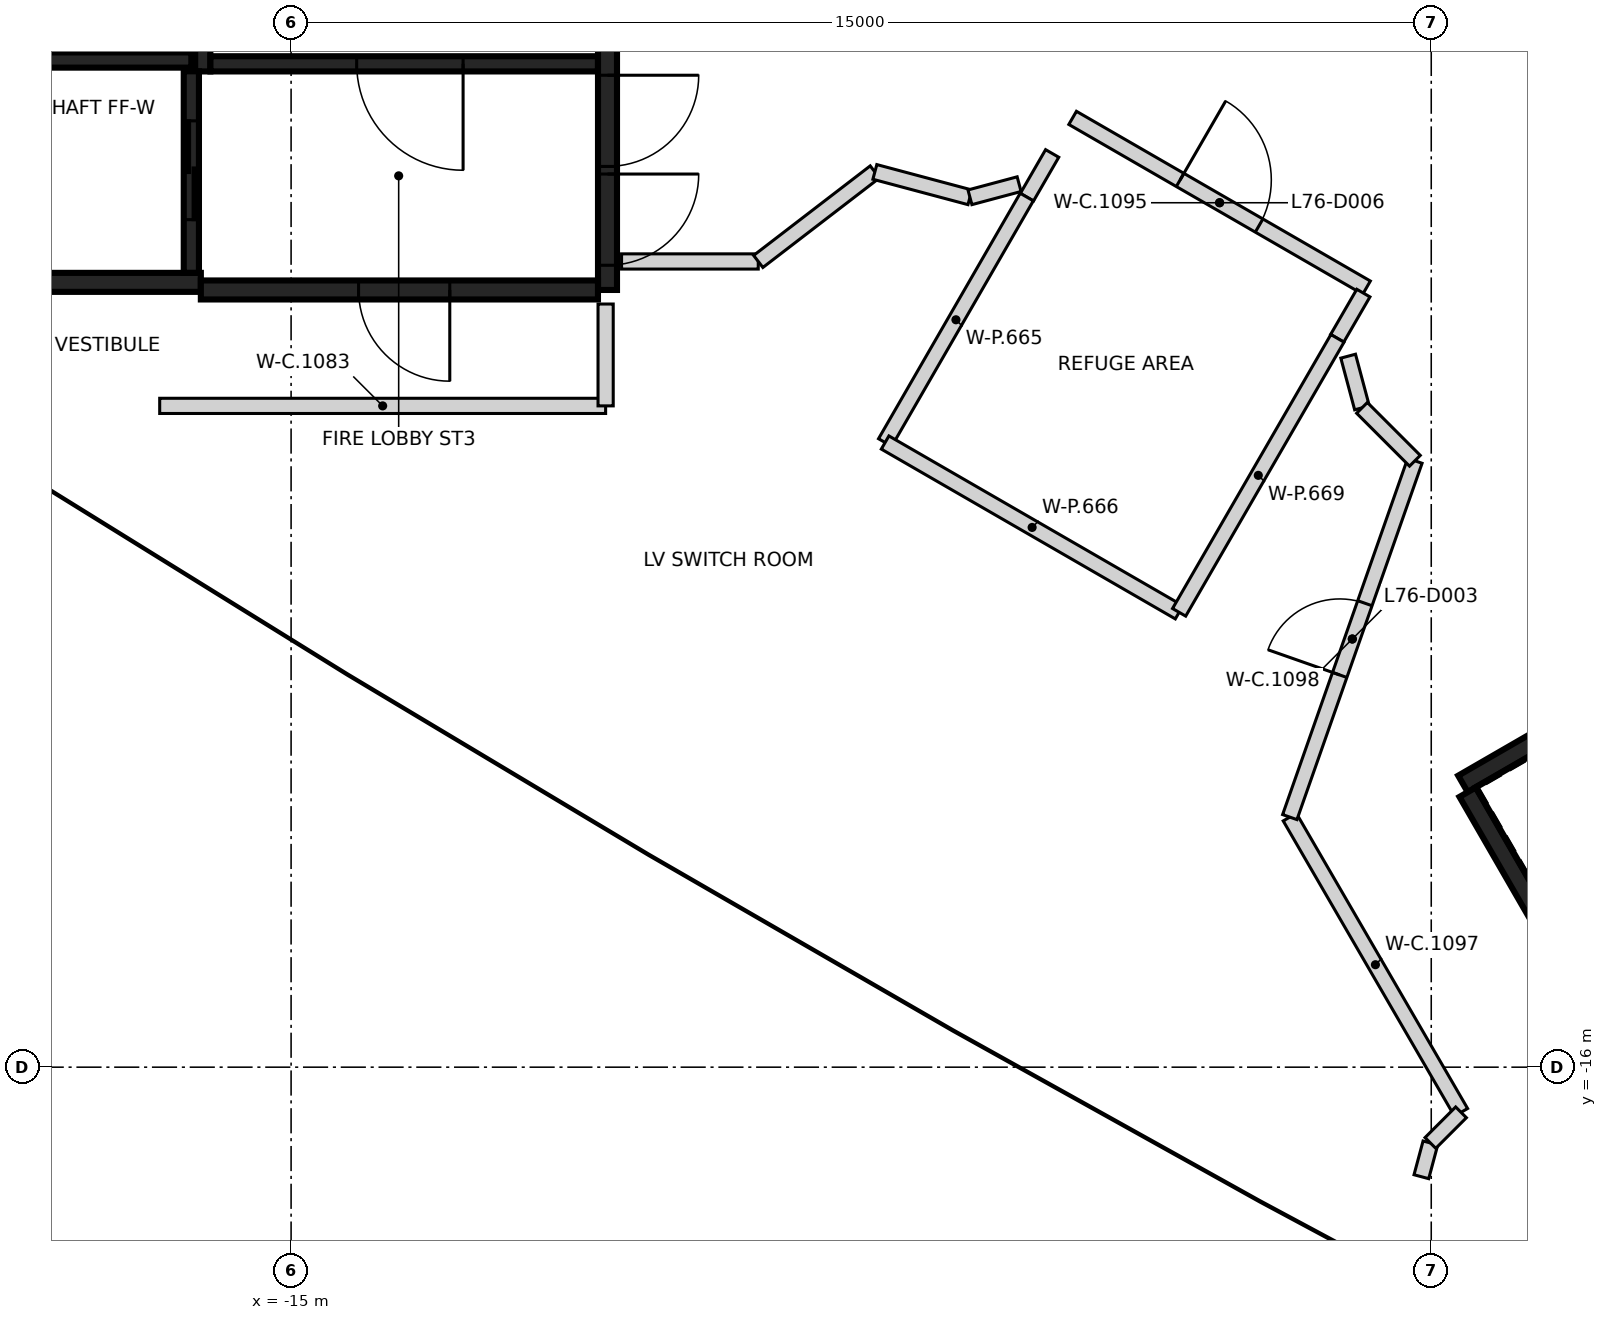
"""IFC4 building model, lengths in metres.
Left out: names, types, materials, properties, quantities, classifications, styles, units other than length and angle.
Written with IfcOpenShell. Run it as: python <this file> out.ifc"""

import sys

from ifc_helpers import new_model, si_unit, direction, frame, frame_2d, origin, place, context, subcontext, project, spatial, rectangle, extrude, element, fill, save


model = new_model("IFC4")
c1 = context("Model", 3, precision=1e-05, world=origin(), true_north=direction((0.0, 1.0)))
c2 = subcontext(c1, "Body", "Model", "MODEL_VIEW")
j1 = project(units=[si_unit("LENGTHUNIT", "METRE"), si_unit("PLANEANGLEUNIT", "RADIAN")], contexts=[c1])
p1 = place(None, origin())
s1 = spatial("IfcSite", under=j1, at=p1, CompositionType="ELEMENT")
p2 = place(p1, origin())
s2 = spatial("IfcBuilding", under=s1, at=p2, CompositionType="ELEMENT")
p3 = place(p2, frame((0.0, 0.0, 301.8)))
s3 = spatial("IfcBuildingStorey", under=s2, at=p3, CompositionType="ELEMENT", Elevation=301.8)
p4 = place(p3, frame((-10.837, 5.775, 0.0), z_axis=(0.0, 0.0, 1.0), x_axis=(0.0, -1.0, 0.0)))
e1 = element("IfcWall", 1, at=p4, inside=s3, PredefinedType="SHEAR", context=c2, shape_type="SweptSolid", body=[
    extrude(rectangle(XDim=11.55, YDim=0.25, at=frame_2d((5.775, 0.0))), origin(), (0.0, 0.0, 1.0), 4.45),
])
p5 = place(p4, frame((10.025, 0.0, 0.0)))
e2 = element("IfcOpeningElement", 2, at=p5, cuts=e1, PredefinedType="OPENING", context=c2, shape_type="SweptSolid", body=[
    extrude(rectangle(XDim=1.2, YDim=2.1, at=frame_2d((0.6, 1.05))), frame((0.0, 0.135, 0.0), z_axis=(0.0, -1.0, 0.0), x_axis=(1.0, 0.0, 0.0)), (0.0, 0.0, 1.0), 0.27),
])
p6 = place(p4, frame((8.725, 0.0, 0.0)))
e3 = element("IfcOpeningElement", 3, at=p6, cuts=e1, PredefinedType="OPENING", context=c2, shape_type="SweptSolid", body=[
    extrude(rectangle(XDim=1.2, YDim=2.1, at=frame_2d((0.6, 1.05))), frame((0.0, 0.135, 0.0), z_axis=(0.0, -1.0, 0.0), x_axis=(1.0, 0.0, 0.0)), (0.0, 0.0, 1.0), 0.27),
])
p7 = place(p3, frame((-16.187, -5.675, 0.0), z_axis=(0.0, 0.0, 1.0), x_axis=(-1.0, 0.0, 0.0)))
e4 = element("IfcWall", 4, at=p7, inside=s3, PredefinedType="SHEAR", context=c2, shape_type="SweptSolid", body=[
    extrude(rectangle(XDim=6.125, YDim=0.25, at=frame_2d((3.062, 0.0))), origin(), (0.0, 0.0, 1.0), 4.45),
])
p8 = place(p7, frame((4.563, 0.0, 0.0)))
e5 = element("IfcOpeningElement", 5, at=p8, cuts=e4, PredefinedType="OPENING", context=c2, shape_type="SweptSolid", body=[
    extrude(rectangle(XDim=1.0, YDim=2.1, at=frame_2d((0.5, 1.05))), frame((0.0, 0.135, 0.0), z_axis=(0.0, -1.0, 0.0), x_axis=(1.0, 0.0, 0.0)), (0.0, 0.0, 1.0), 0.27),
])
p9 = place(p3, frame((-10.963, -5.775, 0.0), z_axis=(0.0, 0.0, 1.0), x_axis=(-1.0, 0.0, 0.0)))
e6 = element("IfcWall", 6, at=p9, inside=s3, PredefinedType="SHEAR", context=c2, shape_type="SweptSolid", body=[
    extrude(rectangle(XDim=5.225, YDim=0.25, at=frame_2d((2.612, 0.0))), origin(), (0.0, 0.0, 1.0), 4.45),
])
p10 = place(p9, frame((1.95, 0.0, 0.0)))
e7 = element("IfcOpeningElement", 7, at=p10, cuts=e6, PredefinedType="OPENING", context=c2, shape_type="SweptSolid", body=[
    extrude(rectangle(XDim=1.2, YDim=2.1, at=frame_2d((0.6, 1.05))), frame((0.0, 0.135, 0.0), z_axis=(0.0, -1.0, 0.0), x_axis=(1.0, 0.0, 0.0)), (0.0, 0.0, 1.0), 0.27),
])
p11 = place(p3, frame((-16.162, 3.074, 0.0), z_axis=(0.0, 0.0, 1.0), x_axis=(0.0, -1.0, 0.0)))
e8 = element("IfcWall", 8, at=p11, inside=s3, PredefinedType="SHEAR", context=c2, shape_type="SweptSolid", body=[
    extrude(rectangle(XDim=5.974, YDim=0.2, at=frame_2d((2.987, 0.0))), origin(), (0.0, 0.0, 1.0), 4.45),
])
p12 = place(p3, frame((-10.963, -2.8, 0.0), z_axis=(0.0, 0.0, 1.0), x_axis=(-1.0, 0.0, 0.0)))
e9 = element("IfcWall", 9, at=p12, inside=s3, PredefinedType="SHEAR", context=c2, shape_type="SweptSolid", body=[
    extrude(rectangle(XDim=5.098, YDim=0.2, at=frame_2d((2.549, 0.0))), origin(), (0.0, 0.0, 1.0), 4.45),
])
p13 = place(p12, frame((1.774, 0.0, 0.0)))
e10 = element("IfcOpeningElement", 10, at=p13, cuts=e9, PredefinedType="OPENING", context=c2, shape_type="SweptSolid", body=[
    extrude(rectangle(XDim=1.4, YDim=2.1, at=frame_2d((0.7, 1.05))), frame((0.0, 0.11, 0.0), z_axis=(0.0, -1.0, 0.0), x_axis=(1.0, 0.0, 0.0)), (0.0, 0.0, 1.0), 0.22),
])
p14 = place(p3, frame((-19.412, -2.75, 0.0), z_axis=(0.0, 0.0, 1.0), x_axis=(1.0, 0.0, 0.0)))
e11 = element("IfcWall", 11, at=p14, inside=s3, PredefinedType="SHEAR", context=c2, shape_type="SweptSolid", body=[
    extrude(rectangle(XDim=3.1, YDim=0.2, at=frame_2d((1.55, 0.0))), origin(), (0.0, 0.0, 1.0), 4.45),
])
p15 = place(p3, frame((-16.312, -2.898, 0.0), z_axis=(0.0, 0.0, 1.0), x_axis=(0.0, -1.0, 0.0)))
e12 = element("IfcWall", 12, at=p15, inside=s3, PredefinedType="SHEAR", context=c2, shape_type="SweptSolid", body=[
    extrude(rectangle(XDim=2.651, YDim=0.2, at=frame_2d((1.325, 0.0))), origin(), (0.0, 0.0, 1.0), 4.45),
])
p16 = place(p15, frame((0.652, 0.0, 0.0)))
e13 = element("IfcOpeningElement", 13, at=p16, cuts=e12, PredefinedType="OPENING", context=c2, shape_type="SweptSolid", body=[
    extrude(rectangle(XDim=1.3, YDim=2.1, at=frame_2d((0.65, 1.05))), frame((0.0, 0.11, 0.0), z_axis=(0.0, -1.0, 0.0), x_axis=(1.0, 0.0, 0.0)), (0.0, 0.0, 1.0), 0.22),
])
p17 = place(p3, frame((0.417, -12.273, 0.0), z_axis=(0.0, 0.0, 1.0), x_axis=(0.866021906294, 0.500006057782, 0.0)))
e14 = element("IfcWall", 14, at=p17, inside=s3, PredefinedType="SHEAR", context=c2, shape_type="SweptSolid", body=[
    extrude(rectangle(XDim=11.55, YDim=0.25, at=frame_2d((5.775, 0.0))), origin(), (0.0, 0.0, 1.0), 4.45),
])
p18 = place(p17, frame((10.025, 0.0, 0.0)))
e15 = element("IfcOpeningElement", 15, at=p18, cuts=e14, PredefinedType="OPENING", context=c2, shape_type="SweptSolid", body=[
    extrude(rectangle(XDim=1.2, YDim=2.1, at=frame_2d((0.6, 1.05))), frame((0.0, 0.135, 0.0), z_axis=(0.0, -1.0, 0.0), x_axis=(1.0, 0.0, 0.0)), (0.0, 0.0, 1.0), 0.27),
])
p19 = place(p17, frame((8.725, 0.0, 0.0)))
e16 = element("IfcOpeningElement", 16, at=p19, cuts=e14, PredefinedType="OPENING", context=c2, shape_type="SweptSolid", body=[
    extrude(rectangle(XDim=1.2, YDim=2.1, at=frame_2d((0.6, 1.05))), frame((0.0, 0.135, 0.0), z_axis=(0.0, -1.0, 0.0), x_axis=(1.0, 0.0, 0.0)), (0.0, 0.0, 1.0), 0.27),
])
p20 = place(p3, frame((3.235, -17.153, 0.0), z_axis=(0.0, 0.0, 1.0), x_axis=(-0.500008851346, 0.866020293397, 0.0)))
e17 = element("IfcWall", 17, at=p20, inside=s3, PredefinedType="SHEAR", context=c2, shape_type="SweptSolid", body=[
    extrude(rectangle(XDim=5.51, YDim=0.25, at=frame_2d((2.755, 0.0))), origin(), (0.0, 0.0, 1.0), 4.45),
])
p21 = place(p3, frame((-16.729, -7.3, 0.0), z_axis=(0.0, 0.0, 1.0), x_axis=(1.0, 0.0, 0.0)))
e18 = element("IfcWall", 18, at=p21, inside=s3, PredefinedType="PARTITIONING", context=c2, shape_type="SweptSolid", body=[
    extrude(rectangle(XDim=5.867, YDim=0.2, at=frame_2d((2.933, 0.0))), origin(), (0.0, 0.0, 1.0), 4.45),
])
p22 = place(p3, frame((-10.862, -7.3, 0.0), z_axis=(0.0, 0.0, 1.0), x_axis=(0.0, 1.0, 0.0)))
e19 = element("IfcWall", 19, at=p22, inside=s3, PredefinedType="PARTITIONING", context=c2, shape_type="SweptSolid", body=[
    extrude(rectangle(XDim=1.34, YDim=0.2, at=frame_2d((0.67, 0.0))), origin(), (0.0, 0.0, 1.0), 4.45),
])
p23 = place(p3, frame((-10.652, -5.4, 0.0), z_axis=(0.0, 0.0, 1.0), x_axis=(1.0, 0.0, 0.0)))
e20 = element("IfcWall", 20, at=p23, inside=s3, PredefinedType="PARTITIONING", context=c2, shape_type="SweptSolid", body=[
    extrude(rectangle(XDim=1.798, YDim=0.2, at=frame_2d((0.899, 0.0))), origin(), (0.0, 0.0, 1.0), 4.45),
])
p24 = place(p3, frame((-8.854, -5.4, 0.0), z_axis=(0.0, 0.0, 1.0), x_axis=(0.793116457917, 0.609070015828, 0.0)))
e21 = element("IfcWall", 21, at=p24, inside=s3, PredefinedType="PARTITIONING", context=c2, shape_type="SweptSolid", body=[
    extrude(rectangle(XDim=1.934, YDim=0.2, at=frame_2d((0.967, 0.0))), origin(), (0.0, 0.0, 1.0), 4.45),
])
p25 = place(p3, frame((-7.32, -4.222, 0.0), z_axis=(0.0, 0.0, 1.0), x_axis=(0.966159789195, -0.257944299691, 0.0)))
e22 = element("IfcWall", 22, at=p25, inside=s3, PredefinedType="PARTITIONING", context=c2, shape_type="SweptSolid", body=[
    extrude(rectangle(XDim=1.295, YDim=0.2, at=frame_2d((0.647, 0.0))), origin(), (0.0, 0.0, 1.0), 4.45),
])
p26 = place(p3, frame((-6.069, -4.556, 0.0), z_axis=(0.0, 0.0, 1.0), x_axis=(0.966113813523, 0.258116445273, 0.0)))
e23 = element("IfcWall", 23, at=p26, inside=s3, PredefinedType="PARTITIONING", context=c2, shape_type="SweptSolid", body=[
    extrude(rectangle(XDim=0.67, YDim=0.2, at=frame_2d((0.335, 0.0))), origin(), (0.0, 0.0, 1.0), 4.45),
])
p27 = place(p3, frame((-5.319, -4.554, 0.0), z_axis=(0.0, 0.0, 1.0), x_axis=(0.500093796661, 0.865971243484, 0.0)))
e24 = element("IfcWall", 24, at=p27, inside=s3, PredefinedType="PARTITIONING", context=c2, shape_type="SweptSolid", body=[
    extrude(rectangle(XDim=0.664, YDim=0.2, at=frame_2d((0.332, 0.0))), origin(), (0.0, 0.0, 1.0), 4.45),
])
p28 = place(p3, frame((-4.718, -3.511, 0.0), z_axis=(0.0, 0.0, 1.0), x_axis=(0.865993462583, -0.500055319703, 0.0)))
e25 = element("IfcWall", 25, at=p28, inside=s3, PredefinedType="PARTITIONING", context=c2, shape_type="SweptSolid", body=[
    extrude(rectangle(XDim=4.465, YDim=0.2, at=frame_2d((2.233, 0.0))), origin(), (0.0, 0.0, 1.0), 4.45),
])
p29 = place(p28, frame((1.633, 0.0, 0.0)))
e26 = element("IfcOpeningElement", 26, at=p29, cuts=e25, PredefinedType="OPENING", context=c2, shape_type="SweptSolid", body=[
    extrude(rectangle(XDim=1.2, YDim=2.1, at=frame_2d((0.6, 1.05))), frame((0.0, 0.11, 0.0), z_axis=(0.0, -1.0, 0.0), x_axis=(1.0, 0.0, 0.0)), (0.0, 0.0, 1.0), 0.22),
])
p30 = place(p3, frame((-1.861, -12.71, 0.0), z_axis=(0.0, 0.0, 1.0), x_axis=(0.501790506815, -0.864989183326, 0.0)))
e27 = element("IfcWall", 27, at=p30, inside=s3, PredefinedType="PARTITIONING", context=c2, shape_type="SweptSolid", body=[
    extrude(rectangle(XDim=4.49, YDim=0.2, at=frame_2d((2.245, 0.0))), origin(), (0.0, 0.0, 1.0), 4.45),
])
p31 = place(p3, frame((-1.861, -12.71, 0.0), z_axis=(0.0, 0.0, 1.0), x_axis=(0.331282665584, 0.943531555108, 0.0)))
e28 = element("IfcWall", 28, at=p31, inside=s3, PredefinedType="PARTITIONING", context=c2, shape_type="SweptSolid", body=[
    extrude(rectangle(XDim=4.969, YDim=0.2, at=frame_2d((2.484, 0.0))), origin(), (0.0, 0.0, 1.0), 4.45),
])
p32 = place(p31, frame((1.982, 0.0, 0.0)))
e29 = element("IfcOpeningElement", 29, at=p32, cuts=e28, PredefinedType="OPENING", context=c2, shape_type="SweptSolid", body=[
    extrude(rectangle(XDim=1.0, YDim=2.1, at=frame_2d((0.5, 1.05))), frame((0.0, 0.11, 0.0), z_axis=(0.0, -1.0, 0.0), x_axis=(1.0, 0.0, 0.0)), (0.0, 0.0, 1.0), 0.22),
])
p33 = place(p3, frame((-1.237, -6.41, 0.0), z_axis=(0.0, 0.0, 1.0), x_axis=(0.501148429931, 0.865361341393, 0.0)))
e30 = element("IfcWall", 30, at=p33, inside=s3, PredefinedType="PARTITIONING", context=c2, shape_type="SweptSolid", body=[
    extrude(rectangle(XDim=0.687, YDim=0.2, at=frame_2d((0.343, 0.0))), origin(), (0.0, 0.0, 1.0), 4.45),
])
p34 = place(p3, frame((-1.093, -6.646, 0.0), z_axis=(0.0, 0.0, 1.0), x_axis=(0.258741864149, -0.965946503558, 0.0)))
e31 = element("IfcWall", 31, at=p34, inside=s3, PredefinedType="PARTITIONING", context=c2, shape_type="SweptSolid", body=[
    extrude(rectangle(XDim=0.704, YDim=0.2, at=frame_2d((0.352, 0.0))), origin(), (0.0, 0.0, 1.0), 4.45),
])
p35 = place(p3, frame((-0.911, -7.326, 0.0), z_axis=(0.0, 0.0, 1.0), x_axis=(0.706982738249, -0.707230802368, 0.0)))
e32 = element("IfcWall", 32, at=p35, inside=s3, PredefinedType="PARTITIONING", context=c2, shape_type="SweptSolid", body=[
    extrude(rectangle(XDim=0.984, YDim=0.2, at=frame_2d((0.492, 0.0))), origin(), (0.0, 0.0, 1.0), 4.45),
])
p36 = place(p3, frame((-0.13, -17.441, 0.0), z_axis=(0.0, 0.0, 1.0), x_axis=(0.258753790643, 0.965943308806, 0.0)))
e33 = element("IfcWall", 33, at=p36, inside=s3, PredefinedType="PARTITIONING", context=c2, shape_type="SweptSolid", body=[
    extrude(rectangle(XDim=0.459, YDim=0.2, at=frame_2d((0.23, 0.0))), origin(), (0.0, 0.0, 1.0), 4.45),
])
p37 = place(p3, frame((-0.011, -16.997, 0.0), z_axis=(0.0, 0.0, 1.0), x_axis=(0.707106781187, 0.707106781187, 0.0)))
e34 = element("IfcWall", 34, at=p37, inside=s3, PredefinedType="PARTITIONING", context=c2, shape_type="SweptSolid", body=[
    extrude(rectangle(XDim=0.57, YDim=0.2, at=frame_2d((0.285, 0.0))), origin(), (0.0, 0.0, 1.0), 4.45),
])
p38 = place(p3, frame((-7.185, -7.782, 0.0), z_axis=(0.0, 0.0, 1.0), x_axis=(0.499794252385, 0.866144159642, 0.0)))
e35 = element("IfcWall", 35, at=p38, inside=s3, PredefinedType="PARTITIONING", context=c2, shape_type="SweptSolid", body=[
    extrude(rectangle(XDim=3.729, YDim=0.2, at=frame_2d((1.864, 0.0))), origin(), (0.0, 0.0, 1.0), 4.45),
])
p39 = place(p3, frame((-7.185, -7.782, 0.0), z_axis=(0.0, 0.0, 1.0), x_axis=(0.865943452446, -0.500141917025, 0.0)))
e36 = element("IfcWall", 36, at=p39, inside=s3, PredefinedType="PARTITIONING", context=c2, shape_type="SweptSolid", body=[
    extrude(rectangle(XDim=4.467, YDim=0.2, at=frame_2d((2.233, 0.0))), origin(), (0.0, 0.0, 1.0), 4.45),
])
p40 = place(p3, frame((-3.317, -10.016, 0.0), z_axis=(0.0, 0.0, 1.0), x_axis=(0.500307886715, 0.865847572319, 0.0)))
e37 = element("IfcWall", 37, at=p40, inside=s3, PredefinedType="PARTITIONING", context=c2, shape_type="SweptSolid", body=[
    extrude(rectangle(XDim=4.163, YDim=0.2, at=frame_2d((2.082, 0.0))), origin(), (0.0, 0.0, 1.0), 4.45),
])
p41 = place(p16, origin())
e38 = element("IfcDoor", 38, at=p41, inside=s3, OperationType="SLIDING_TO_RIGHT", PredefinedType="DOOR", context=c2, shape_type="SweptSolid", body=[
    extrude(rectangle(XDim=1.3, YDim=2.1, at=frame_2d((0.65, 1.05))), frame((0.0, 0.025, 0.0), z_axis=(0.0, -1.0, 0.0), x_axis=(1.0, 0.0, 0.0)), (0.0, 0.0, 1.0), 0.05),
])
fill(e13, e38)
p42 = place(p5, origin())
e39 = element("IfcDoor", 39, at=p42, inside=s3, OperationType="SINGLE_SWING_LEFT", PredefinedType="DOOR", context=c2, shape_type="SweptSolid", body=[
    extrude(rectangle(XDim=1.2, YDim=2.1, at=frame_2d((0.6, 1.05))), frame((0.0, 0.025, 0.0), z_axis=(0.0, -1.0, 0.0), x_axis=(1.0, 0.0, 0.0)), (0.0, 0.0, 1.0), 0.05),
])
fill(e2, e39)
p43 = place(p6, origin())
e40 = element("IfcDoor", 40, at=p43, inside=s3, OperationType="SINGLE_SWING_RIGHT", PredefinedType="DOOR", context=c2, shape_type="SweptSolid", body=[
    extrude(rectangle(XDim=1.2, YDim=2.1, at=frame_2d((0.6, 1.05))), frame((0.0, 0.025, 0.0), z_axis=(0.0, -1.0, 0.0), x_axis=(1.0, 0.0, 0.0)), (0.0, 0.0, 1.0), 0.05),
])
fill(e3, e40)
p44 = place(p13, origin())
e41 = element("IfcDoor", 41, at=p44, inside=s3, OperationType="SINGLE_SWING_RIGHT", PredefinedType="DOOR", context=c2, shape_type="SweptSolid", body=[
    extrude(rectangle(XDim=1.4, YDim=2.1, at=frame_2d((0.7, 1.05))), frame((0.0, 0.025, 0.0), z_axis=(0.0, -1.0, 0.0), x_axis=(1.0, 0.0, 0.0)), (0.0, 0.0, 1.0), 0.05),
])
fill(e10, e41)
p45 = place(p10, origin())
e42 = element("IfcDoor", 42, at=p45, inside=s3, OperationType="SINGLE_SWING_LEFT", PredefinedType="DOOR", context=c2, shape_type="SweptSolid", body=[
    extrude(rectangle(XDim=1.2, YDim=2.1, at=frame_2d((0.6, 1.05))), frame((0.0, 0.025, 0.0), z_axis=(0.0, -1.0, 0.0), x_axis=(1.0, 0.0, 0.0)), (0.0, 0.0, 1.0), 0.05),
])
fill(e7, e42)
p46 = place(p32, origin())
e43 = element("IfcDoor", 43, at=p46, inside=s3, OperationType="SINGLE_SWING_LEFT", PredefinedType="DOOR", context=c2, shape_type="SweptSolid", body=[
    extrude(rectangle(XDim=1.0, YDim=2.1, at=frame_2d((0.5, 1.05))), frame((0.0, 0.025, 0.0), z_axis=(0.0, -1.0, 0.0), x_axis=(1.0, 0.0, 0.0)), (0.0, 0.0, 1.0), 0.05),
])
fill(e29, e43)
p47 = place(p29, frame((1.2, 0.0, 0.0), z_axis=(0.0, 0.0, 1.0), x_axis=(-1.0, 0.0, 0.0)))
e44 = element("IfcDoor", 44, at=p47, inside=s3, OperationType="SINGLE_SWING_LEFT", PredefinedType="DOOR", context=c2, shape_type="SweptSolid", body=[
    extrude(rectangle(XDim=1.2, YDim=2.1, at=frame_2d((0.6, 1.05))), frame((0.0, 0.025, 0.0), z_axis=(0.0, -1.0, 0.0), x_axis=(1.0, 0.0, 0.0)), (0.0, 0.0, 1.0), 0.05),
])
fill(e26, e44)
save(model, sys.argv[1])
